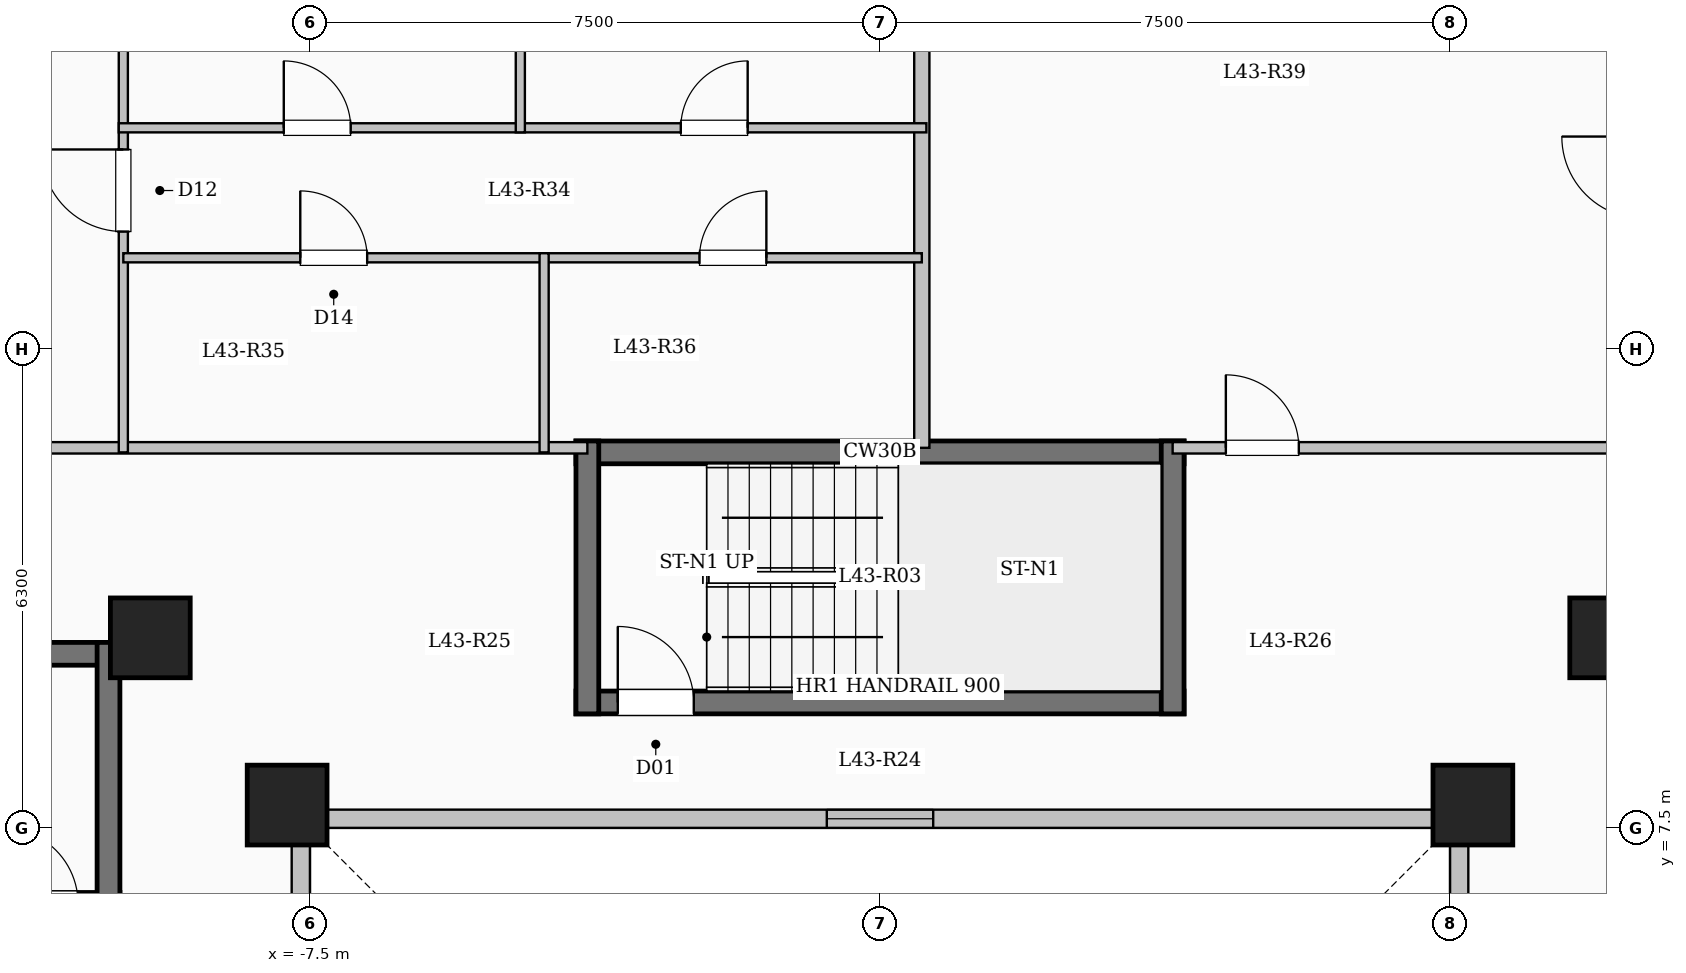
"""IFC4 building model, lengths in metres.
Left out: names, types, materials, properties, quantities, classifications, styles, units other than length and angle.
Written with IfcOpenShell. Run it as: python <this file> out.ifc"""

import sys

from ifc_helpers import new_model, si_unit, direction, frame, frame_2d, origin, origin_2d, place, context, subcontext, project, spatial, rectangle, extrude, element, fill, save


model = new_model("IFC4")
c1 = context("Model", 3, precision=1e-05, world=origin(), true_north=direction((0.0, 1.0)))
c2 = subcontext(c1, "Body", "Model", "MODEL_VIEW")
j1 = project(units=[si_unit("LENGTHUNIT", "METRE"), si_unit("PLANEANGLEUNIT", "RADIAN")], contexts=[c1])
p1 = place(None, origin())
s1 = spatial("IfcSite", under=j1, at=p1, CompositionType="ELEMENT")
p2 = place(p1, origin())
s2 = spatial("IfcBuilding", under=s1, at=p2, CompositionType="ELEMENT")
p3 = place(p2, frame((0.0, 0.0, 159.4)))
s3 = spatial("IfcBuildingStorey", under=s2, at=p3, CompositionType="ELEMENT", Elevation=159.4)
for number, where, z_axis, x_axis in (
    (1, (-7.8, 7.8, 0.0), (0.0, 0.0, 1.0), (1.0, 0.0, 0.0)),
    (2, (7.8, 7.8, 0.0), (0.0, 0.0, 1.0), (1.0, 0.0, 0.0)),
    (3, (-9.6, 10.0, 0.0), (0.0, 0.0, 1.0), (1.0, 0.0, 0.0)),
    (4, (9.6, 10.0, 0.0), (0.0, 0.0, 1.0), (1.0, 0.0, 0.0)),
):
    element("IfcColumn", number, at=place(p3, frame(where, z_axis=z_axis, x_axis=x_axis)), inside=s3, PredefinedType="COLUMN", context=c2, shape_type="SweptSolid", body=[
        extrude(rectangle(XDim=1.05, YDim=1.05, at=origin_2d()), origin(), (0.0, 0.0, 1.0), 3.35),
    ])
p4 = place(p3, frame((7.62, -7.62, 0.0), z_axis=(0.0, 0.0, 1.0), x_axis=(0.0, 1.0, 0.0)))
e5 = element("IfcWall", 5, at=p4, inside=s3, PredefinedType="SOLIDWALL", context=c2, shape_type="SweptSolid", body=[
    extrude(rectangle(XDim=15.24, YDim=0.24, at=frame_2d((7.62, 0.0))), origin(), (0.0, 0.0, 1.0), 3.1),
])
p5 = place(p4, frame((6.92, 0.0, 0.95)))
e6 = element("IfcOpeningElement", 6, at=p5, cuts=e5, PredefinedType="OPENING", context=c2, shape_type="SweptSolid", body=[
    extrude(rectangle(XDim=1.4, YDim=1.5, at=frame_2d((0.7, 0.75))), frame((0.0, 0.13, 0.0), z_axis=(0.0, -1.0, 0.0), x_axis=(1.0, 0.0, 0.0)), (0.0, 0.0, 1.0), 0.26),
])
p6 = place(p3, frame((7.62, 7.62, 0.0), z_axis=(0.0, 0.0, 1.0), x_axis=(-1.0, 0.0, 0.0)))
e7 = element("IfcWall", 7, at=p6, inside=s3, PredefinedType="SOLIDWALL", context=c2, shape_type="SweptSolid", body=[
    extrude(rectangle(XDim=15.24, YDim=0.24, at=frame_2d((7.62, 0.0))), origin(), (0.0, 0.0, 1.0), 3.1),
])
p7 = place(p6, frame((6.92, 0.0, 0.95)))
e8 = element("IfcOpeningElement", 8, at=p7, cuts=e7, PredefinedType="OPENING", context=c2, shape_type="SweptSolid", body=[
    extrude(rectangle(XDim=1.4, YDim=1.5, at=frame_2d((0.7, 0.75))), frame((0.0, 0.13, 0.0), z_axis=(0.0, -1.0, 0.0), x_axis=(1.0, 0.0, 0.0)), (0.0, 0.0, 1.0), 0.26),
])
p8 = place(p3, frame((-7.62, 7.62, 0.0), z_axis=(0.0, 0.0, 1.0), x_axis=(0.0, -1.0, 0.0)))
e9 = element("IfcWall", 9, at=p8, inside=s3, PredefinedType="SOLIDWALL", context=c2, shape_type="SweptSolid", body=[
    extrude(rectangle(XDim=15.24, YDim=0.24, at=frame_2d((7.62, 0.0))), origin(), (0.0, 0.0, 1.0), 3.1),
])
p9 = place(p8, frame((6.92, 0.0, 0.95)))
e10 = element("IfcOpeningElement", 10, at=p9, cuts=e9, PredefinedType="OPENING", context=c2, shape_type="SweptSolid", body=[
    extrude(rectangle(XDim=1.4, YDim=1.5, at=frame_2d((0.7, 0.75))), frame((0.0, 0.13, 0.0), z_axis=(0.0, -1.0, 0.0), x_axis=(1.0, 0.0, 0.0)), (0.0, 0.0, 1.0), 0.26),
])
p10 = place(p3, frame((-18.0, 9.79, 0.0), z_axis=(0.0, 0.0, 1.0), x_axis=(1.0, 0.0, 0.0)))
e11 = element("IfcWall", 11, at=p10, inside=s3, PredefinedType="SHEAR", context=c2, shape_type="SweptSolid", body=[
    extrude(rectangle(XDim=8.0, YDim=0.3, at=frame_2d((4.0, 0.0))), origin(), (0.0, 0.0, 1.0), 3.35),
])
p11 = place(p3, frame((-18.0, 6.5, 0.0), z_axis=(0.0, 0.0, 1.0), x_axis=(1.0, 0.0, 0.0)))
e12 = element("IfcWall", 12, at=p11, inside=s3, PredefinedType="SHEAR", context=c2, shape_type="SweptSolid", body=[
    extrude(rectangle(XDim=8.0, YDim=0.3, at=frame_2d((4.0, 0.0))), origin(), (0.0, 0.0, 1.0), 3.35),
])
p12 = place(p11, frame((6.45, 0.0, 0.0)))
e13 = element("IfcOpeningElement", 13, at=p12, cuts=e12, PredefinedType="OPENING", context=c2, shape_type="SweptSolid", body=[
    extrude(rectangle(XDim=1.0, YDim=2.15, at=frame_2d((0.5, 1.075))), frame((0.0, 0.16, 0.0), z_axis=(0.0, -1.0, 0.0), x_axis=(1.0, 0.0, 0.0)), (0.0, 0.0, 1.0), 0.32),
])
p13 = place(p3, frame((-10.15, 6.35, 0.0), z_axis=(0.0, 0.0, 1.0), x_axis=(0.0, 1.0, 0.0)))
e14 = element("IfcWall", 14, at=p13, inside=s3, PredefinedType="SHEAR", context=c2, shape_type="SweptSolid", body=[
    extrude(rectangle(XDim=3.59, YDim=0.3, at=frame_2d((1.795, 0.0))), origin(), (0.0, 0.0, 1.0), 3.35),
])
p14 = place(p3, frame((-4.0, 12.44, 0.0), z_axis=(0.0, 0.0, 1.0), x_axis=(1.0, 0.0, 0.0)))
e15 = element("IfcWall", 15, at=p14, inside=s3, PredefinedType="SHEAR", context=c2, shape_type="SweptSolid", body=[
    extrude(rectangle(XDim=8.0, YDim=0.3, at=frame_2d((4.0, 0.0))), origin(), (0.0, 0.0, 1.0), 3.35),
])
p15 = place(p3, frame((-4.0, 9.15, 0.0), z_axis=(0.0, 0.0, 1.0), x_axis=(1.0, 0.0, 0.0)))
e16 = element("IfcWall", 16, at=p15, inside=s3, PredefinedType="SHEAR", context=c2, shape_type="SweptSolid", body=[
    extrude(rectangle(XDim=8.0, YDim=0.3, at=frame_2d((4.0, 0.0))), origin(), (0.0, 0.0, 1.0), 3.35),
])
p16 = place(p15, frame((0.55, 0.0, 0.0)))
e17 = element("IfcOpeningElement", 17, at=p16, cuts=e16, PredefinedType="OPENING", context=c2, shape_type="SweptSolid", body=[
    extrude(rectangle(XDim=1.0, YDim=2.15, at=frame_2d((0.5, 1.075))), frame((0.0, 0.16, 0.0), z_axis=(0.0, -1.0, 0.0), x_axis=(1.0, 0.0, 0.0)), (0.0, 0.0, 1.0), 0.32),
])
for number, where, z_axis, x_axis in (
    (18, (-3.85, 9.0, 0.0), (0.0, 0.0, 1.0), (0.0, 1.0, 0.0)),
    (19, (3.85, 9.0, 0.0), (0.0, 0.0, 1.0), (0.0, 1.0, 0.0)),
):
    element("IfcWall", number, at=place(p3, frame(where, z_axis=z_axis, x_axis=x_axis)), inside=s3, PredefinedType="SHEAR", context=c2, shape_type="SweptSolid", body=[
        extrude(rectangle(XDim=3.59, YDim=0.3, at=frame_2d((1.795, 0.0))), origin(), (0.0, 0.0, 1.0), 3.35),
    ])
p17 = place(p3, frame((-19.55, 12.5, 0.0), z_axis=(0.0, 0.0, 1.0), x_axis=(1.0, 0.0, 0.0)))
e20 = element("IfcWall", 20, at=p17, inside=s3, PredefinedType="PARTITIONING", context=c2, shape_type="SweptSolid", body=[
    extrude(rectangle(XDim=15.7, YDim=0.15, at=frame_2d((7.85, 0.0))), origin(), (0.0, 0.0, 1.0), 3.1),
])
p18 = place(p17, frame((0.7, 0.0, 0.0)))
e21 = element("IfcOpeningElement", 21, at=p18, cuts=e20, PredefinedType="OPENING", context=c2, shape_type="SweptSolid", body=[
    extrude(rectangle(XDim=0.96, YDim=2.15, at=frame_2d((0.48, 1.075))), frame((0.0, 0.085, 0.0), z_axis=(0.0, -1.0, 0.0), x_axis=(1.0, 0.0, 0.0)), (0.0, 0.0, 1.0), 0.17),
])
p19 = place(p3, frame((3.85, 12.5, 0.0), z_axis=(0.0, 0.0, 1.0), x_axis=(1.0, 0.0, 0.0)))
e22 = element("IfcWall", 22, at=p19, inside=s3, PredefinedType="PARTITIONING", context=c2, shape_type="SweptSolid", body=[
    extrude(rectangle(XDim=15.7, YDim=0.15, at=frame_2d((7.85, 0.0))), origin(), (0.0, 0.0, 1.0), 3.1),
])
p20 = place(p19, frame((0.7, 0.0, 0.0)))
e23 = element("IfcOpeningElement", 23, at=p20, cuts=e22, PredefinedType="OPENING", context=c2, shape_type="SweptSolid", body=[
    extrude(rectangle(XDim=0.96, YDim=2.15, at=frame_2d((0.48, 1.075))), frame((0.0, 0.085, 0.0), z_axis=(0.0, -1.0, 0.0), x_axis=(1.0, 0.0, 0.0)), (0.0, 0.0, 1.0), 0.17),
])
p21 = place(p3, frame((0.55, 12.5, 0.0), z_axis=(0.0, 0.0, 1.0), x_axis=(0.0, 1.0, 0.0)))
e24 = element("IfcWall", 24, at=p21, inside=s3, PredefinedType="SOLIDWALL", context=c2, shape_type="SweptSolid", body=[
    extrude(rectangle(XDim=10.18, YDim=0.2, at=frame_2d((5.09, 0.0))), origin(), (0.0, 0.0, 1.0), 3.1),
])
p22 = place(p3, frame((-9.955, 12.44, 0.0), z_axis=(0.0, 0.0, 1.0), x_axis=(0.0, 1.0, 0.0)))
e25 = element("IfcWall", 25, at=p22, inside=s3, PredefinedType="PARTITIONING", context=c2, shape_type="SweptSolid", body=[
    extrude(rectangle(XDim=9.018, YDim=0.12, at=frame_2d((4.509, 0.0))), origin(), (0.0, 0.0, 1.0), 3.1),
])
p23 = place(p22, frame((2.905, 0.0, 0.0)))
e26 = element("IfcOpeningElement", 26, at=p23, cuts=e25, PredefinedType="OPENING", context=c2, shape_type="SweptSolid", body=[
    extrude(rectangle(XDim=1.08, YDim=2.15, at=frame_2d((0.54, 1.075))), frame((0.0, 0.07, 0.0), z_axis=(0.0, -1.0, 0.0), x_axis=(1.0, 0.0, 0.0)), (0.0, 0.0, 1.0), 0.14),
])
p24 = place(p3, frame((-9.955, 15.0, 0.0), z_axis=(0.0, 0.0, 1.0), x_axis=(1.0, 0.0, 0.0)))
e27 = element("IfcWall", 27, at=p24, inside=s3, PredefinedType="PARTITIONING", context=c2, shape_type="SweptSolid", body=[
    extrude(rectangle(XDim=5.536, YDim=0.12, at=frame_2d((2.768, 0.0))), origin(), (0.0, 0.0, 1.0), 3.1),
])
p25 = place(p24, frame((2.328, 0.0, 0.0)))
e28 = element("IfcOpeningElement", 28, at=p25, cuts=e27, PredefinedType="OPENING", context=c2, shape_type="SweptSolid", body=[
    extrude(rectangle(XDim=0.88, YDim=2.1, at=frame_2d((0.44, 1.05))), frame((0.0, 0.07, 0.0), z_axis=(0.0, -1.0, 0.0), x_axis=(1.0, 0.0, 0.0)), (0.0, 0.0, 1.0), 0.14),
])
p26 = place(p3, frame((-4.419, 15.0, 0.0), z_axis=(0.0, 0.0, 1.0), x_axis=(1.0, 0.0, 0.0)))
e29 = element("IfcWall", 29, at=p26, inside=s3, PredefinedType="PARTITIONING", context=c2, shape_type="SweptSolid", body=[
    extrude(rectangle(XDim=4.969, YDim=0.12, at=frame_2d((2.484, 0.0))), origin(), (0.0, 0.0, 1.0), 3.1),
])
p27 = place(p26, frame((2.044, 0.0, 0.0)))
e30 = element("IfcOpeningElement", 30, at=p27, cuts=e29, PredefinedType="OPENING", context=c2, shape_type="SweptSolid", body=[
    extrude(rectangle(XDim=0.88, YDim=2.1, at=frame_2d((0.44, 1.05))), frame((0.0, 0.07, 0.0), z_axis=(0.0, -1.0, 0.0), x_axis=(1.0, 0.0, 0.0)), (0.0, 0.0, 1.0), 0.14),
])
p28 = place(p3, frame((-10.015, 16.71, 0.0), z_axis=(0.0, 0.0, 1.0), x_axis=(1.0, 0.0, 0.0)))
e31 = element("IfcWall", 31, at=p28, inside=s3, PredefinedType="PARTITIONING", context=c2, shape_type="SweptSolid", body=[
    extrude(rectangle(XDim=10.625, YDim=0.12, at=frame_2d((5.312, 0.0))), origin(), (0.0, 0.0, 1.0), 3.1),
])
p29 = place(p28, frame((2.171, 0.0, 0.0)))
e32 = element("IfcOpeningElement", 32, at=p29, cuts=e31, PredefinedType="OPENING", context=c2, shape_type="SweptSolid", body=[
    extrude(rectangle(XDim=0.88, YDim=2.1, at=frame_2d((0.44, 1.05))), frame((0.0, 0.07, 0.0), z_axis=(0.0, -1.0, 0.0), x_axis=(1.0, 0.0, 0.0)), (0.0, 0.0, 1.0), 0.14),
])
p30 = place(p28, frame((7.394, 0.0, 0.0)))
e33 = element("IfcOpeningElement", 33, at=p30, cuts=e31, PredefinedType="OPENING", context=c2, shape_type="SweptSolid", body=[
    extrude(rectangle(XDim=0.88, YDim=2.1, at=frame_2d((0.44, 1.05))), frame((0.0, 0.07, 0.0), z_axis=(0.0, -1.0, 0.0), x_axis=(1.0, 0.0, 0.0)), (0.0, 0.0, 1.0), 0.14),
])
p31 = place(p3, frame((-4.419, 12.44, 0.0), z_axis=(0.0, 0.0, 1.0), x_axis=(0.0, 1.0, 0.0)))
e34 = element("IfcWall", 34, at=p31, inside=s3, PredefinedType="PARTITIONING", context=c2, shape_type="SweptSolid", body=[
    extrude(rectangle(XDim=2.62, YDim=0.12, at=frame_2d((1.31, 0.0))), origin(), (0.0, 0.0, 1.0), 3.1),
])
p32 = place(p3, frame((-4.732, 16.65, 0.0), z_axis=(0.0, 0.0, 1.0), x_axis=(0.0, 1.0, 0.0)))
e35 = element("IfcWall", 35, at=p32, inside=s3, PredefinedType="PARTITIONING", context=c2, shape_type="SweptSolid", body=[
    extrude(rectangle(XDim=6.03, YDim=0.12, at=frame_2d((3.015, 0.0))), origin(), (0.0, 0.0, 1.0), 3.1),
])
p33 = place(p7, origin())
e36 = element("IfcWindow", 36, at=p33, inside=s3, PartitioningType="SINGLE_PANEL", PredefinedType="WINDOW", context=c2, shape_type="SweptSolid", body=[
    extrude(rectangle(XDim=1.4, YDim=1.5, at=frame_2d((0.7, 0.75))), frame((0.0, 0.03, 0.0), z_axis=(0.0, -1.0, 0.0), x_axis=(1.0, 0.0, 0.0)), (0.0, 0.0, 1.0), 0.06),
])
fill(e8, e36)
p34 = place(p16, origin())
e37 = element("IfcDoor", 37, at=p34, inside=s3, OperationType="SINGLE_SWING_LEFT", PredefinedType="DOOR", context=c2, shape_type="SweptSolid", body=[
    extrude(rectangle(XDim=1.0, YDim=2.15, at=frame_2d((0.5, 1.075))), frame((0.0, 0.025, 0.0), z_axis=(0.0, -1.0, 0.0), x_axis=(1.0, 0.0, 0.0)), (0.0, 0.0, 1.0), 0.05),
])
fill(e17, e37)
p35 = place(p23, origin())
e38 = element("IfcDoor", 38, at=p35, inside=s3, OperationType="SINGLE_SWING_RIGHT", PredefinedType="DOOR", context=c2, shape_type="SweptSolid", body=[
    extrude(rectangle(XDim=1.08, YDim=2.15, at=frame_2d((0.54, 1.075))), frame((0.0, 0.025, 0.0), z_axis=(0.0, -1.0, 0.0), x_axis=(1.0, 0.0, 0.0)), (0.0, 0.0, 1.0), 0.05),
])
fill(e26, e38)
p36 = place(p25, origin())
e39 = element("IfcDoor", 39, at=p36, inside=s3, OperationType="SINGLE_SWING_LEFT", PredefinedType="DOOR", context=c2, shape_type="SweptSolid", body=[
    extrude(rectangle(XDim=0.88, YDim=2.1, at=frame_2d((0.44, 1.05))), frame((0.0, 0.025, 0.0), z_axis=(0.0, -1.0, 0.0), x_axis=(1.0, 0.0, 0.0)), (0.0, 0.0, 1.0), 0.05),
])
fill(e28, e39)
p37 = place(p27, origin())
e40 = element("IfcDoor", 40, at=p37, inside=s3, OperationType="SINGLE_SWING_RIGHT", PredefinedType="DOOR", context=c2, shape_type="SweptSolid", body=[
    extrude(rectangle(XDim=0.88, YDim=2.1, at=frame_2d((0.44, 1.05))), frame((0.0, 0.025, 0.0), z_axis=(0.0, -1.0, 0.0), x_axis=(1.0, 0.0, 0.0)), (0.0, 0.0, 1.0), 0.05),
])
fill(e30, e40)
p38 = place(p29, origin())
e41 = element("IfcDoor", 41, at=p38, inside=s3, OperationType="SINGLE_SWING_LEFT", PredefinedType="DOOR", context=c2, shape_type="SweptSolid", body=[
    extrude(rectangle(XDim=0.88, YDim=2.1, at=frame_2d((0.44, 1.05))), frame((0.0, 0.025, 0.0), z_axis=(0.0, -1.0, 0.0), x_axis=(1.0, 0.0, 0.0)), (0.0, 0.0, 1.0), 0.05),
])
fill(e32, e41)
p39 = place(p30, origin())
e42 = element("IfcDoor", 42, at=p39, inside=s3, OperationType="SINGLE_SWING_RIGHT", PredefinedType="DOOR", context=c2, shape_type="SweptSolid", body=[
    extrude(rectangle(XDim=0.88, YDim=2.1, at=frame_2d((0.44, 1.05))), frame((0.0, 0.025, 0.0), z_axis=(0.0, -1.0, 0.0), x_axis=(1.0, 0.0, 0.0)), (0.0, 0.0, 1.0), 0.05),
])
fill(e33, e42)
p40 = place(p20, origin())
e43 = element("IfcDoor", 43, at=p40, inside=s3, OperationType="SINGLE_SWING_LEFT", PredefinedType="DOOR", context=c2, shape_type="SweptSolid", body=[
    extrude(rectangle(XDim=0.96, YDim=2.15, at=frame_2d((0.48, 1.075))), frame((0.0, 0.025, 0.0), z_axis=(0.0, -1.0, 0.0), x_axis=(1.0, 0.0, 0.0)), (0.0, 0.0, 1.0), 0.05),
])
fill(e23, e43)
save(model, sys.argv[1])
